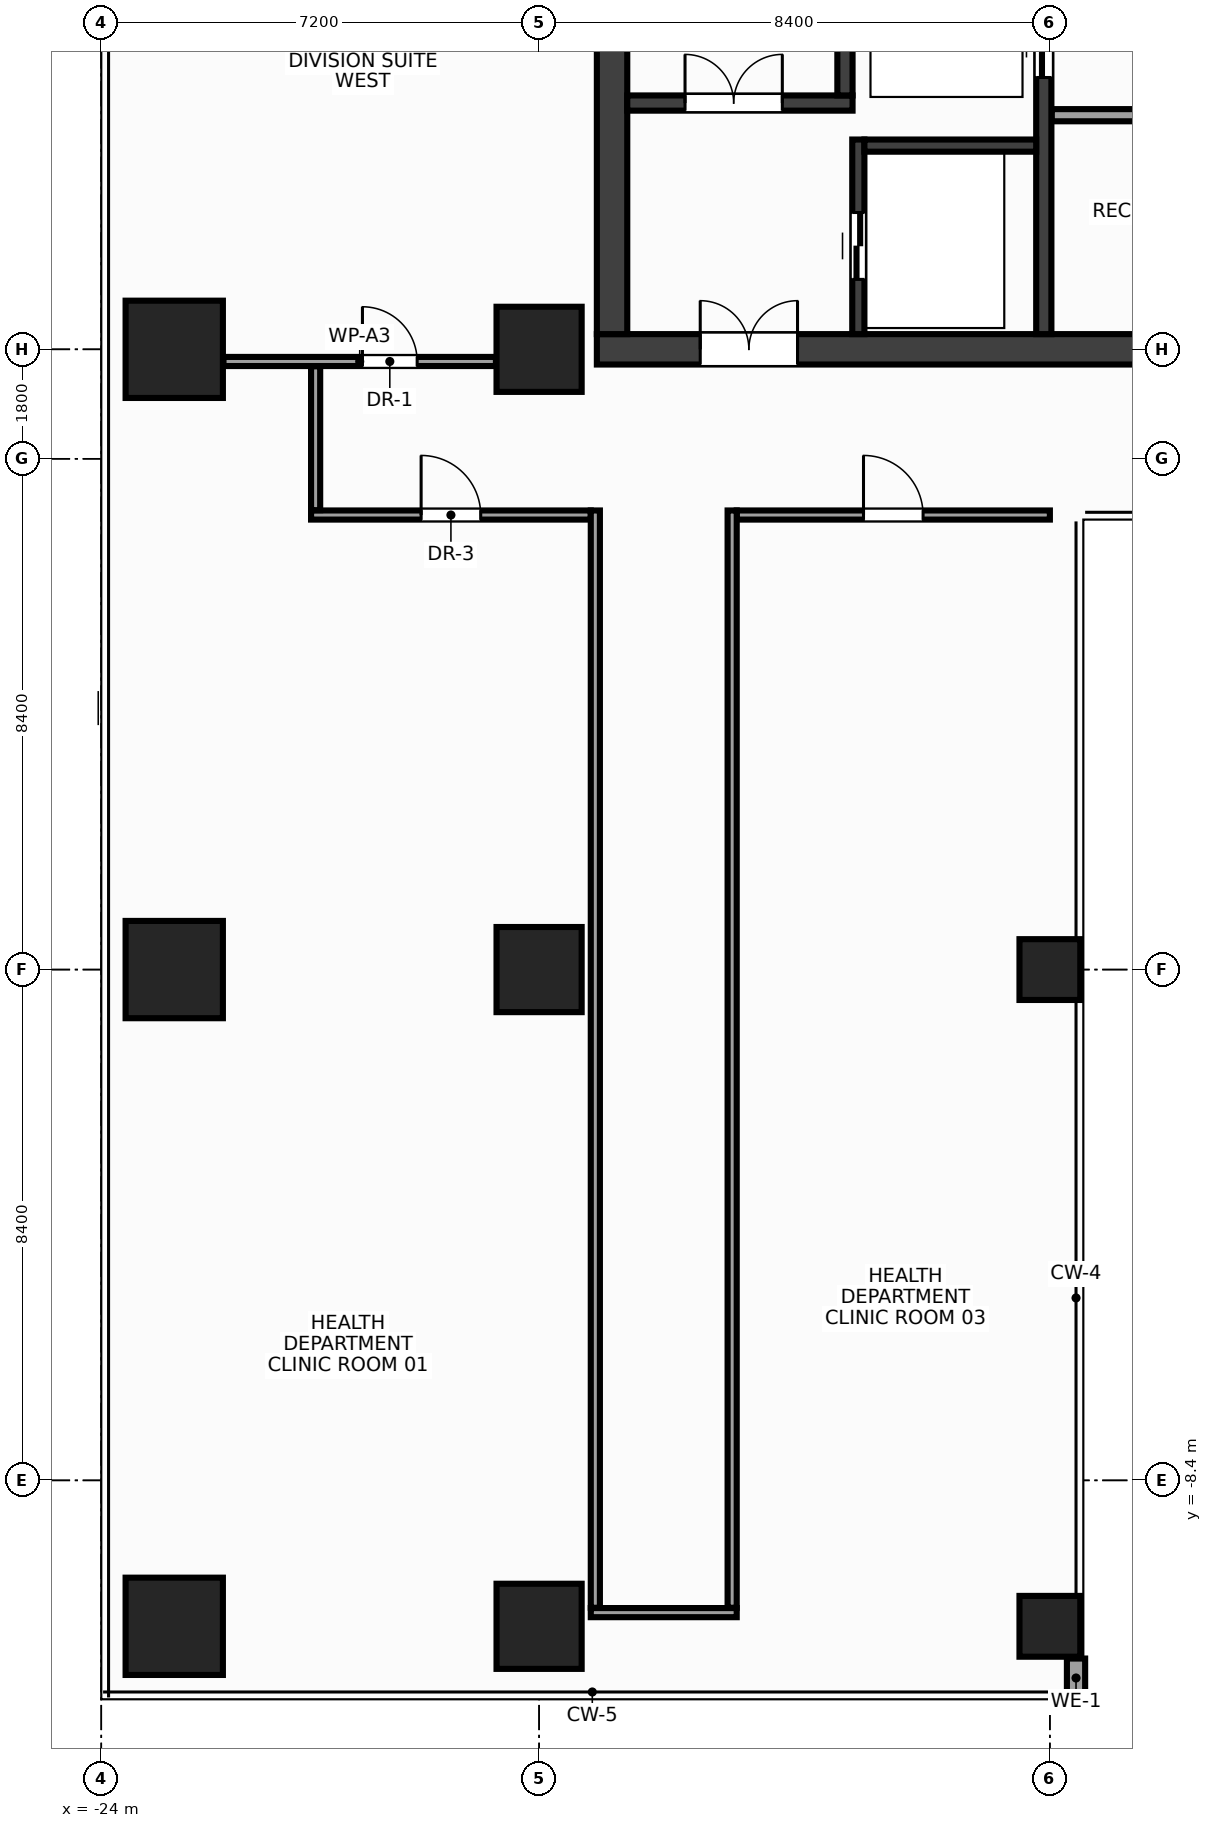
"""IFC4 building model, lengths in metres.
Left out: names, types, materials, properties, quantities, classifications, styles, units other than length and angle.
Written with IfcOpenShell. Run it as: python <this file> out.ifc"""

import sys

from ifc_helpers import new_model, si_unit, direction, frame, frame_2d, origin, origin_2d, place, context, subcontext, project, spatial, rectangle, hollow_rectangle, extrude, source, transform, mapped, element, fill, save


model = new_model("IFC4")
c1 = context("Model", 3, precision=1e-05, world=origin(), true_north=direction((0.0, 1.0)))
c2 = subcontext(c1, "Body", "Model", "MODEL_VIEW")
j1 = project(units=[si_unit("LENGTHUNIT", "METRE"), si_unit("PLANEANGLEUNIT", "RADIAN")], contexts=[c1])
p1 = place(None, origin())
s1 = spatial("IfcSite", under=j1, at=p1, CompositionType="ELEMENT")
p2 = place(p1, origin())
s2 = spatial("IfcBuilding", under=s1, at=p2, CompositionType="ELEMENT")
p3 = place(p2, frame((0.0, 0.0, 210.8)))
s3 = spatial("IfcBuildingStorey", under=s2, at=p3, CompositionType="ELEMENT", Elevation=210.8)
m1 = source(origin(), c2, "Body", "SweptSolid", [
    extrude(rectangle(XDim=31.7, YDim=0.5, at=frame_2d((15.85, 0.0))), origin(), (0.0, 0.0, 1.0), 3.6),
])
p4 = place(p3, frame((-15.85, 10.2, 0.0), z_axis=(0.0, 0.0, 1.0), x_axis=(1.0, 0.0, 0.0)))
e1 = element("IfcWall", 1, at=p4, inside=s3, PredefinedType="SHEAR", context=c2, shape_type="MappedRepresentation", body=[
    mapped(m1, transform((0.0, 0.0, 0.0), x_axis=(1.0, 0.0, 0.0), y_axis=(0.0, 1.0, 0.0), z_axis=(0.0, 0.0, 1.0), scale=1.0)),
])
p5 = place(p4, frame((1.7, 0.0, 0.0)))
e2 = element("IfcOpeningElement", 2, at=p5, cuts=e1, PredefinedType="OPENING", context=c2, shape_type="SweptSolid", body=[
    extrude(rectangle(XDim=1.6, YDim=2.15, at=frame_2d((0.8, 1.075))), frame((0.0, 0.262, 0.0), z_axis=(0.0, -1.0, 0.0), x_axis=(1.0, 0.0, 0.0)), (0.0, 0.0, 1.0), 0.524),
])
p6 = place(p4, frame((28.4, 0.0, 0.0)))
e3 = element("IfcOpeningElement", 3, at=p6, cuts=e1, PredefinedType="OPENING", context=c2, shape_type="SweptSolid", body=[
    extrude(rectangle(XDim=1.6, YDim=2.15, at=frame_2d((0.8, 1.075))), frame((0.0, 0.262, 0.0), z_axis=(0.0, -1.0, 0.0), x_axis=(1.0, 0.0, 0.0)), (0.0, 0.0, 1.0), 0.524),
])
p7 = place(p4, frame((15.1, 0.0, 0.0)))
e4 = element("IfcOpeningElement", 4, at=p7, cuts=e1, PredefinedType="OPENING", context=c2, shape_type="SweptSolid", body=[
    extrude(rectangle(XDim=1.5, YDim=2.2, at=frame_2d((0.75, 1.1))), frame((0.0, 0.262, 0.0), z_axis=(0.0, -1.0, 0.0), x_axis=(1.0, 0.0, 0.0)), (0.0, 0.0, 1.0), 0.524),
])
m2 = source(origin(), c2, "Body", "SweptSolid", [
    extrude(rectangle(XDim=13.1, YDim=0.5, at=frame_2d((6.55, 0.0))), origin(), (0.0, 0.0, 1.0), 3.6),
])
p8 = place(p3, frame((-15.6, 10.45, 0.0), z_axis=(0.0, 0.0, 1.0), x_axis=(0.0, 1.0, 0.0)))
e5 = element("IfcWall", 5, at=p8, inside=s3, PredefinedType="SHEAR", context=c2, shape_type="MappedRepresentation", body=[
    mapped(m2, transform((0.0, 0.0, 0.0), x_axis=(1.0, 0.0, 0.0), y_axis=(0.0, 1.0, 0.0), z_axis=(0.0, 0.0, 1.0), scale=1.0)),
])
m3 = source(origin(), c2, "Body", "SweptSolid", [
    extrude(rectangle(XDim=13.1, YDim=0.25, at=frame_2d((6.55, 0.0))), origin(), (0.0, 0.0, 1.0), 3.6),
])
p9 = place(p3, frame((-8.5, 10.45, 0.0), z_axis=(0.0, 0.0, 1.0), x_axis=(0.0, 1.0, 0.0)))
e6 = element("IfcWall", 6, at=p9, inside=s3, PredefinedType="SHEAR", context=c2, shape_type="MappedRepresentation", body=[
    mapped(m3, transform((0.0, 0.0, 0.0), x_axis=(1.0, 0.0, 0.0), y_axis=(0.0, 1.0, 0.0), z_axis=(0.0, 0.0, 1.0), scale=1.0)),
])
p10 = place(p9, frame((4.22, 0.0, 0.0)))
e7 = element("IfcOpeningElement", 7, at=p10, cuts=e6, PredefinedType="OPENING", context=c2, shape_type="SweptSolid", body=[
    extrude(rectangle(XDim=1.1, YDim=2.15, at=frame_2d((0.55, 1.075))), frame((0.0, 0.137, 0.0), z_axis=(0.0, -1.0, 0.0), x_axis=(1.0, 0.0, 0.0)), (0.0, 0.0, 1.0), 0.274),
])
p11 = place(p9, frame((6.14, 0.0, 0.0)))
e8 = element("IfcOpeningElement", 8, at=p11, cuts=e6, PredefinedType="OPENING", context=c2, shape_type="SweptSolid", body=[
    extrude(rectangle(XDim=1.1, YDim=2.15, at=frame_2d((0.55, 1.075))), frame((0.0, 0.137, 0.0), z_axis=(0.0, -1.0, 0.0), x_axis=(1.0, 0.0, 0.0)), (0.0, 0.0, 1.0), 0.274),
])
p12 = place(p9, frame((8.06, 0.0, 0.0)))
e9 = element("IfcOpeningElement", 9, at=p12, cuts=e6, PredefinedType="OPENING", context=c2, shape_type="SweptSolid", body=[
    extrude(rectangle(XDim=1.1, YDim=2.15, at=frame_2d((0.55, 1.075))), frame((0.0, 0.137, 0.0), z_axis=(0.0, -1.0, 0.0), x_axis=(1.0, 0.0, 0.0)), (0.0, 0.0, 1.0), 0.274),
])
m4 = source(origin(), c2, "Body", "SweptSolid", [
    extrude(rectangle(XDim=3.705, YDim=0.25, at=frame_2d((1.853, 0.0))), origin(), (0.0, 0.0, 1.0), 3.6),
])
p13 = place(p3, frame((-15.35, 14.25, 0.0), z_axis=(0.0, 0.0, 1.0), x_axis=(1.0, 0.0, 0.0)))
e10 = element("IfcWall", 10, at=p13, inside=s3, PredefinedType="SHEAR", context=c2, shape_type="MappedRepresentation", body=[
    mapped(m4, transform((0.0, 0.0, 0.0), x_axis=(1.0, 0.0, 0.0), y_axis=(0.0, 1.0, 0.0), z_axis=(0.0, 0.0, 1.0), scale=1.0)),
])
p14 = place(p13, frame((0.95, 0.0, 0.0)))
e11 = element("IfcOpeningElement", 11, at=p14, cuts=e10, PredefinedType="OPENING", context=c2, shape_type="SweptSolid", body=[
    extrude(rectangle(XDim=1.6, YDim=2.15, at=frame_2d((0.8, 1.075))), frame((0.0, 0.137, 0.0), z_axis=(0.0, -1.0, 0.0), x_axis=(1.0, 0.0, 0.0)), (0.0, 0.0, 1.0), 0.274),
])
m5 = source(origin(), c2, "Body", "SweptSolid", [
    extrude(rectangle(XDim=9.175, YDim=0.25, at=frame_2d((4.587, 0.0))), origin(), (0.0, 0.0, 1.0), 3.6),
])
p15 = place(p3, frame((-11.77, 14.375, 0.0), z_axis=(0.0, 0.0, 1.0), x_axis=(0.0, 1.0, 0.0)))
e12 = element("IfcWall", 12, at=p15, inside=s3, PredefinedType="SHEAR", context=c2, shape_type="MappedRepresentation", body=[
    mapped(m5, transform((0.0, 0.0, 0.0), x_axis=(1.0, 0.0, 0.0), y_axis=(0.0, 1.0, 0.0), z_axis=(0.0, 0.0, 1.0), scale=1.0)),
])
m6 = source(origin(), c2, "Body", "SweptSolid", [
    extrude(rectangle(XDim=3.2, YDim=0.2, at=frame_2d((1.6, 0.0))), origin(), (0.0, 0.0, 1.0), 3.6),
])
p16 = place(p3, frame((-11.55, 10.45, 0.0), z_axis=(0.0, 0.0, 1.0), x_axis=(0.0, 1.0, 0.0)))
e13 = element("IfcWall", 13, at=p16, inside=s3, PredefinedType="SHEAR", context=c2, shape_type="MappedRepresentation", body=[
    mapped(m6, transform((0.0, 0.0, 0.0), x_axis=(1.0, 0.0, 0.0), y_axis=(0.0, 1.0, 0.0), z_axis=(0.0, 0.0, 1.0), scale=1.0)),
])
p17 = place(p16, frame((0.9, 0.0, 0.0)))
e14 = element("IfcOpeningElement", 14, at=p17, cuts=e13, PredefinedType="OPENING", context=c2, shape_type="SweptSolid", body=[
    extrude(rectangle(XDim=1.1, YDim=2.15, at=frame_2d((0.55, 1.075))), frame((0.0, 0.112, 0.0), z_axis=(0.0, -1.0, 0.0), x_axis=(1.0, 0.0, 0.0)), (0.0, 0.0, 1.0), 0.224),
])
m7 = source(origin(), c2, "Body", "SweptSolid", [
    extrude(rectangle(XDim=2.825, YDim=0.2, at=frame_2d((1.413, 0.0))), origin(), (0.0, 0.0, 1.0), 3.6),
])
p18 = place(p3, frame((-11.45, 13.55, 0.0), z_axis=(0.0, 0.0, 1.0), x_axis=(1.0, 0.0, 0.0)))
e15 = element("IfcWall", 15, at=p18, inside=s3, PredefinedType="SHEAR", context=c2, shape_type="MappedRepresentation", body=[
    mapped(m7, transform((0.0, 0.0, 0.0), x_axis=(1.0, 0.0, 0.0), y_axis=(0.0, 1.0, 0.0), z_axis=(0.0, 0.0, 1.0), scale=1.0)),
])
m8 = source(origin(), c2, "Body", "SweptSolid", [
    extrude(rectangle(XDim=1.4, YDim=1.4, at=origin_2d()), origin(), (0.0, 0.0, 1.0), 3.6),
])
for number, where, z_axis, x_axis in (
    (16, (-16.8, -10.8, 0.0), (0.0, 0.0, 1.0), (1.0, 0.0, 0.0)),
    (17, (-16.8, 0.0, 0.0), (0.0, 0.0, 1.0), (1.0, 0.0, 0.0)),
    (18, (-16.8, 10.2, 0.0), (0.0, 0.0, 1.0), (1.0, 0.0, 0.0)),
):
    element("IfcColumn", number, at=place(p3, frame(where, z_axis=z_axis, x_axis=x_axis)), inside=s3, PredefinedType="COLUMN", context=c2, shape_type="MappedRepresentation", body=[
        mapped(m8, transform((0.0, 0.0, 0.0), x_axis=(1.0, 0.0, 0.0), y_axis=(0.0, 1.0, 0.0), z_axis=(0.0, 0.0, 1.0), scale=1.0)),
    ])
m9 = source(origin(), c2, "Body", "SweptSolid", [
    extrude(rectangle(XDim=1.6, YDim=1.6, at=origin_2d()), origin(), (0.0, 0.0, 1.0), 3.6),
])
for number, where, z_axis, x_axis in (
    (19, (-22.8, -10.8, 0.0), (0.0, 0.0, 1.0), (1.0, 0.0, 0.0)),
    (20, (-22.8, 0.0, 0.0), (0.0, 0.0, 1.0), (1.0, 0.0, 0.0)),
    (21, (-22.8, 10.2, 0.0), (0.0, 0.0, 1.0), (1.0, 0.0, 0.0)),
):
    element("IfcColumn", number, at=place(p3, frame(where, z_axis=z_axis, x_axis=x_axis)), inside=s3, PredefinedType="COLUMN", context=c2, shape_type="MappedRepresentation", body=[
        mapped(m9, transform((0.0, 0.0, 0.0), x_axis=(1.0, 0.0, 0.0), y_axis=(0.0, 1.0, 0.0), z_axis=(0.0, 0.0, 1.0), scale=1.0)),
    ])
m10 = source(origin(), c2, "Body", "SweptSolid", [
    extrude(hollow_rectangle(XDim=1.0, YDim=1.0, WallThickness=0.045, at=origin_2d()), origin(), (0.0, 0.0, 1.0), 3.6),
])
for number, where, z_axis, x_axis in (
    (22, (-8.4, 0.0, 0.0), (0.0, 0.0, 1.0), (1.0, 0.0, 0.0)),
    (23, (-8.4, -10.8, 0.0), (0.0, 0.0, 1.0), (1.0, 0.0, 0.0)),
):
    element("IfcColumn", number, at=place(p3, frame(where, z_axis=z_axis, x_axis=x_axis)), inside=s3, PredefinedType="COLUMN", context=c2, shape_type="MappedRepresentation", body=[
        mapped(m10, transform((0.0, 0.0, 0.0), x_axis=(1.0, 0.0, 0.0), y_axis=(0.0, 1.0, 0.0), z_axis=(0.0, 0.0, 1.0), scale=1.0)),
    ])
m11 = source(origin(), c2, "Body", "SweptSolid", [
    extrude(rectangle(XDim=0.64, YDim=0.24, at=frame_2d((0.32, 0.0))), origin(), (0.0, 0.0, 1.0), 2.76),
])
p19 = place(p3, frame((-7.97, -11.97, 0.0), z_axis=(0.0, 0.0, 1.0), x_axis=(0.0, 1.0, 0.0)))
e24 = element("IfcWall", 24, at=p19, inside=s3, PredefinedType="STANDARD", context=c2, shape_type="MappedRepresentation", body=[
    mapped(m11, transform((0.0, 0.0, 0.0), x_axis=(1.0, 0.0, 0.0), y_axis=(0.0, 1.0, 0.0), z_axis=(0.0, 0.0, 1.0), scale=1.0)),
])
m12 = source(origin(), c2, "Body", "SweptSolid", [
    extrude(rectangle(XDim=7.07, YDim=0.2, at=frame_2d((3.535, 0.0))), origin(), (0.0, 0.0, 1.0), 3.38),
])
p20 = place(p3, frame((-8.37, 14.05, 0.0), z_axis=(0.0, 0.0, 1.0), x_axis=(1.0, 0.0, 0.0)))
e25 = element("IfcWall", 25, at=p20, inside=s3, PredefinedType="PARTITIONING", context=c2, shape_type="MappedRepresentation", body=[
    mapped(m12, transform((0.0, 0.0, 0.0), x_axis=(1.0, 0.0, 0.0), y_axis=(0.0, 1.0, 0.0), z_axis=(0.0, 0.0, 1.0), scale=1.0)),
])
p21 = place(p20, frame((1.66, 0.0, 0.0)))
e26 = element("IfcOpeningElement", 26, at=p21, cuts=e25, PredefinedType="OPENING", context=c2, shape_type="SweptSolid", body=[
    extrude(rectangle(XDim=0.9, YDim=2.15, at=frame_2d((0.45, 1.075))), frame((0.0, 0.112, 0.0), z_axis=(0.0, -1.0, 0.0), x_axis=(1.0, 0.0, 0.0)), (0.0, 0.0, 1.0), 0.224),
])
p22 = place(p20, frame((5.11, 0.0, 0.0)))
e27 = element("IfcOpeningElement", 27, at=p22, cuts=e25, PredefinedType="OPENING", context=c2, shape_type="SweptSolid", body=[
    extrude(rectangle(XDim=0.9, YDim=2.15, at=frame_2d((0.45, 1.075))), frame((0.0, 0.112, 0.0), z_axis=(0.0, -1.0, 0.0), x_axis=(1.0, 0.0, 0.0)), (0.0, 0.0, 1.0), 0.224),
])
m13 = source(origin(), c2, "Body", "SweptSolid", [
    extrude(rectangle(XDim=4.48, YDim=0.15, at=frame_2d((2.24, 0.0))), origin(), (0.0, 0.0, 1.0), 2.915),
])
p23 = place(p3, frame((-21.99, 10.0, 0.0), z_axis=(0.0, 0.0, 1.0), x_axis=(1.0, 0.0, 0.0)))
e28 = element("IfcWall", 28, at=p23, inside=s3, PredefinedType="PARTITIONING", context=c2, shape_type="MappedRepresentation", body=[
    mapped(m13, transform((0.0, 0.0, 0.0), x_axis=(1.0, 0.0, 0.0), y_axis=(0.0, 1.0, 0.0), z_axis=(0.0, 0.0, 1.0), scale=1.0)),
])
p24 = place(p23, frame((2.285, 0.0, 0.0)))
e29 = element("IfcOpeningElement", 29, at=p24, cuts=e28, PredefinedType="OPENING", context=c2, shape_type="SweptSolid", body=[
    extrude(rectangle(XDim=0.9, YDim=2.15, at=frame_2d((0.45, 1.075))), frame((0.0, 0.087, 0.0), z_axis=(0.0, -1.0, 0.0), x_axis=(1.0, 0.0, 0.0)), (0.0, 0.0, 1.0), 0.174),
])
m14 = source(origin(), c2, "Body", "SweptSolid", [
    extrude(rectangle(XDim=4.6, YDim=0.15, at=frame_2d((2.3, 0.0))), origin(), (0.0, 0.0, 1.0), 2.765),
])
p25 = place(p3, frame((-20.55, 7.475, 0.0), z_axis=(0.0, 0.0, 1.0), x_axis=(1.0, 0.0, 0.0)))
e30 = element("IfcWall", 30, at=p25, inside=s3, PredefinedType="PARTITIONING", context=c2, shape_type="MappedRepresentation", body=[
    mapped(m14, transform((0.0, 0.0, 0.0), x_axis=(1.0, 0.0, 0.0), y_axis=(0.0, 1.0, 0.0), z_axis=(0.0, 0.0, 1.0), scale=1.0)),
])
p26 = place(p25, frame((1.81, 0.0, 0.0)))
e31 = element("IfcOpeningElement", 31, at=p26, cuts=e30, PredefinedType="OPENING", context=c2, shape_type="SweptSolid", body=[
    extrude(rectangle(XDim=0.98, YDim=2.15, at=frame_2d((0.49, 1.075))), frame((0.0, 0.087, 0.0), z_axis=(0.0, -1.0, 0.0), x_axis=(1.0, 0.0, 0.0)), (0.0, 0.0, 1.0), 0.174),
])
m15 = source(origin(), c2, "Body", "SweptSolid", [
    extrude(rectangle(XDim=5.15, YDim=0.15, at=frame_2d((2.575, 0.0))), origin(), (0.0, 0.0, 1.0), 3.38),
])
p27 = place(p3, frame((-13.55, 7.475, 0.0), z_axis=(0.0, 0.0, 1.0), x_axis=(1.0, 0.0, 0.0)))
e32 = element("IfcWall", 32, at=p27, inside=s3, PredefinedType="PARTITIONING", context=c2, shape_type="MappedRepresentation", body=[
    mapped(m15, transform((0.0, 0.0, 0.0), x_axis=(1.0, 0.0, 0.0), y_axis=(0.0, 1.0, 0.0), z_axis=(0.0, 0.0, 1.0), scale=1.0)),
])
p28 = place(p27, frame((2.085, 0.0, 0.0)))
e33 = element("IfcOpeningElement", 33, at=p28, cuts=e32, PredefinedType="OPENING", context=c2, shape_type="SweptSolid", body=[
    extrude(rectangle(XDim=0.98, YDim=2.15, at=frame_2d((0.49, 1.075))), frame((0.0, 0.087, 0.0), z_axis=(0.0, -1.0, 0.0), x_axis=(1.0, 0.0, 0.0)), (0.0, 0.0, 1.0), 0.174),
])
m16 = source(origin(), c2, "Body", "SweptSolid", [
    extrude(rectangle(XDim=2.4, YDim=0.15, at=frame_2d((1.2, 0.0))), origin(), (0.0, 0.0, 1.0), 2.915),
])
p29 = place(p3, frame((-15.95, -10.575, 0.0), z_axis=(0.0, 0.0, 1.0), x_axis=(1.0, 0.0, 0.0)))
e34 = element("IfcWall", 34, at=p29, inside=s3, PredefinedType="PARTITIONING", context=c2, shape_type="MappedRepresentation", body=[
    mapped(m16, transform((0.0, 0.0, 0.0), x_axis=(1.0, 0.0, 0.0), y_axis=(0.0, 1.0, 0.0), z_axis=(0.0, 0.0, 1.0), scale=1.0)),
])
m17 = source(origin(), c2, "Body", "SweptSolid", [
    extrude(rectangle(XDim=2.365, YDim=0.15, at=frame_2d((1.183, 0.0))), origin(), (0.0, 0.0, 1.0), 3.38),
])
p30 = place(p3, frame((-20.475, 7.555, 0.0), z_axis=(0.0, 0.0, 1.0), x_axis=(0.0, 1.0, 0.0)))
e35 = element("IfcWall", 35, at=p30, inside=s3, PredefinedType="PARTITIONING", context=c2, shape_type="MappedRepresentation", body=[
    mapped(m17, transform((0.0, 0.0, 0.0), x_axis=(1.0, 0.0, 0.0), y_axis=(0.0, 1.0, 0.0), z_axis=(0.0, 0.0, 1.0), scale=1.0)),
])
m18 = source(origin(), c2, "Body", "SweptSolid", [
    extrude(rectangle(XDim=18.045, YDim=0.15, at=frame_2d((9.022, 0.0))), origin(), (0.0, 0.0, 1.0), 2.915),
])
for number, where, z_axis, x_axis in (
    (36, (-15.875, -10.495, 0.0), (0.0, 0.0, 1.0), (0.0, 1.0, 0.0)),
    (37, (-13.625, -10.495, 0.0), (0.0, 0.0, 1.0), (0.0, 1.0, 0.0)),
):
    element("IfcWall", number, at=place(p3, frame(where, z_axis=z_axis, x_axis=x_axis)), inside=s3, PredefinedType="PARTITIONING", context=c2, shape_type="MappedRepresentation", body=[
        mapped(m18, transform((0.0, 0.0, 0.0), x_axis=(1.0, 0.0, 0.0), y_axis=(0.0, 1.0, 0.0), z_axis=(0.0, 0.0, 1.0), scale=1.0)),
    ])
m19 = source(origin(), c2, "Body", "SweptSolid", [
    extrude(rectangle(XDim=1.6, YDim=2.15, at=frame_2d((0.8, 1.075))), frame((0.0, 0.025, 0.0), z_axis=(0.0, -1.0, 0.0), x_axis=(1.0, 0.0, 0.0)), (0.0, 0.0, 1.0), 0.05),
])
p31 = place(p14, origin())
e38 = element("IfcDoor", 38, at=p31, inside=s3, OperationType="DOUBLE_DOOR_SINGLE_SWING", PredefinedType="DOOR", context=c2, shape_type="MappedRepresentation", body=[
    mapped(m19, transform((0.0, 0.0, 0.0), x_axis=(1.0, 0.0, 0.0), y_axis=(0.0, 1.0, 0.0), z_axis=(0.0, 0.0, 1.0), scale=1.0)),
])
fill(e11, e38)
p32 = place(p5, origin())
e39 = element("IfcDoor", 39, at=p32, inside=s3, OperationType="DOUBLE_DOOR_SINGLE_SWING", PredefinedType="DOOR", context=c2, shape_type="MappedRepresentation", body=[
    mapped(m19, transform((0.0, 0.0, 0.0), x_axis=(1.0, 0.0, 0.0), y_axis=(0.0, 1.0, 0.0), z_axis=(0.0, 0.0, 1.0), scale=1.0)),
])
fill(e2, e39)
m20 = source(origin(), c2, "Body", "SweptSolid", [
    extrude(rectangle(XDim=1.1, YDim=2.15, at=frame_2d((0.55, 1.075))), frame((0.0, 0.025, 0.0), z_axis=(0.0, -1.0, 0.0), x_axis=(1.0, 0.0, 0.0)), (0.0, 0.0, 1.0), 0.05),
])
p33 = place(p17, origin())
e40 = element("IfcDoor", 40, at=p33, inside=s3, OperationType="DOUBLE_DOOR_SLIDING", PredefinedType="DOOR", context=c2, shape_type="MappedRepresentation", body=[
    mapped(m20, transform((0.0, 0.0, 0.0), x_axis=(1.0, 0.0, 0.0), y_axis=(0.0, 1.0, 0.0), z_axis=(0.0, 0.0, 1.0), scale=1.0)),
])
fill(e14, e40)
p34 = place(p10, origin())
e41 = element("IfcDoor", 41, at=p34, inside=s3, OperationType="DOUBLE_DOOR_SLIDING", PredefinedType="DOOR", context=c2, shape_type="MappedRepresentation", body=[
    mapped(m20, transform((0.0, 0.0, 0.0), x_axis=(1.0, 0.0, 0.0), y_axis=(0.0, 1.0, 0.0), z_axis=(0.0, 0.0, 1.0), scale=1.0)),
])
fill(e7, e41)
m21 = source(origin(), c2, "Body", "SweptSolid", [
    extrude(rectangle(XDim=0.9, YDim=2.15, at=frame_2d((0.45, 1.075))), frame((0.0, 0.025, 0.0), z_axis=(0.0, -1.0, 0.0), x_axis=(1.0, 0.0, 0.0)), (0.0, 0.0, 1.0), 0.05),
])
p35 = place(p24, origin())
e42 = element("IfcDoor", 42, at=p35, inside=s3, OperationType="SINGLE_SWING_LEFT", PredefinedType="DOOR", context=c2, shape_type="MappedRepresentation", body=[
    mapped(m21, transform((0.0, 0.0, 0.0), x_axis=(1.0, 0.0, 0.0), y_axis=(0.0, 1.0, 0.0), z_axis=(0.0, 0.0, 1.0), scale=1.0)),
])
fill(e29, e42)
m22 = source(origin(), c2, "Body", "SweptSolid", [
    extrude(rectangle(XDim=0.98, YDim=2.15, at=frame_2d((0.49, 1.075))), frame((0.0, 0.025, 0.0), z_axis=(0.0, -1.0, 0.0), x_axis=(1.0, 0.0, 0.0)), (0.0, 0.0, 1.0), 0.05),
])
p36 = place(p26, origin())
e43 = element("IfcDoor", 43, at=p36, inside=s3, OperationType="SINGLE_SWING_LEFT", PredefinedType="DOOR", context=c2, shape_type="MappedRepresentation", body=[
    mapped(m22, transform((0.0, 0.0, 0.0), x_axis=(1.0, 0.0, 0.0), y_axis=(0.0, 1.0, 0.0), z_axis=(0.0, 0.0, 1.0), scale=1.0)),
])
fill(e31, e43)
p37 = place(p28, origin())
e44 = element("IfcDoor", 44, at=p37, inside=s3, OperationType="SINGLE_SWING_LEFT", PredefinedType="DOOR", context=c2, shape_type="MappedRepresentation", body=[
    mapped(m22, transform((0.0, 0.0, 0.0), x_axis=(1.0, 0.0, 0.0), y_axis=(0.0, 1.0, 0.0), z_axis=(0.0, 0.0, 1.0), scale=1.0)),
])
fill(e33, e44)
save(model, sys.argv[1])
